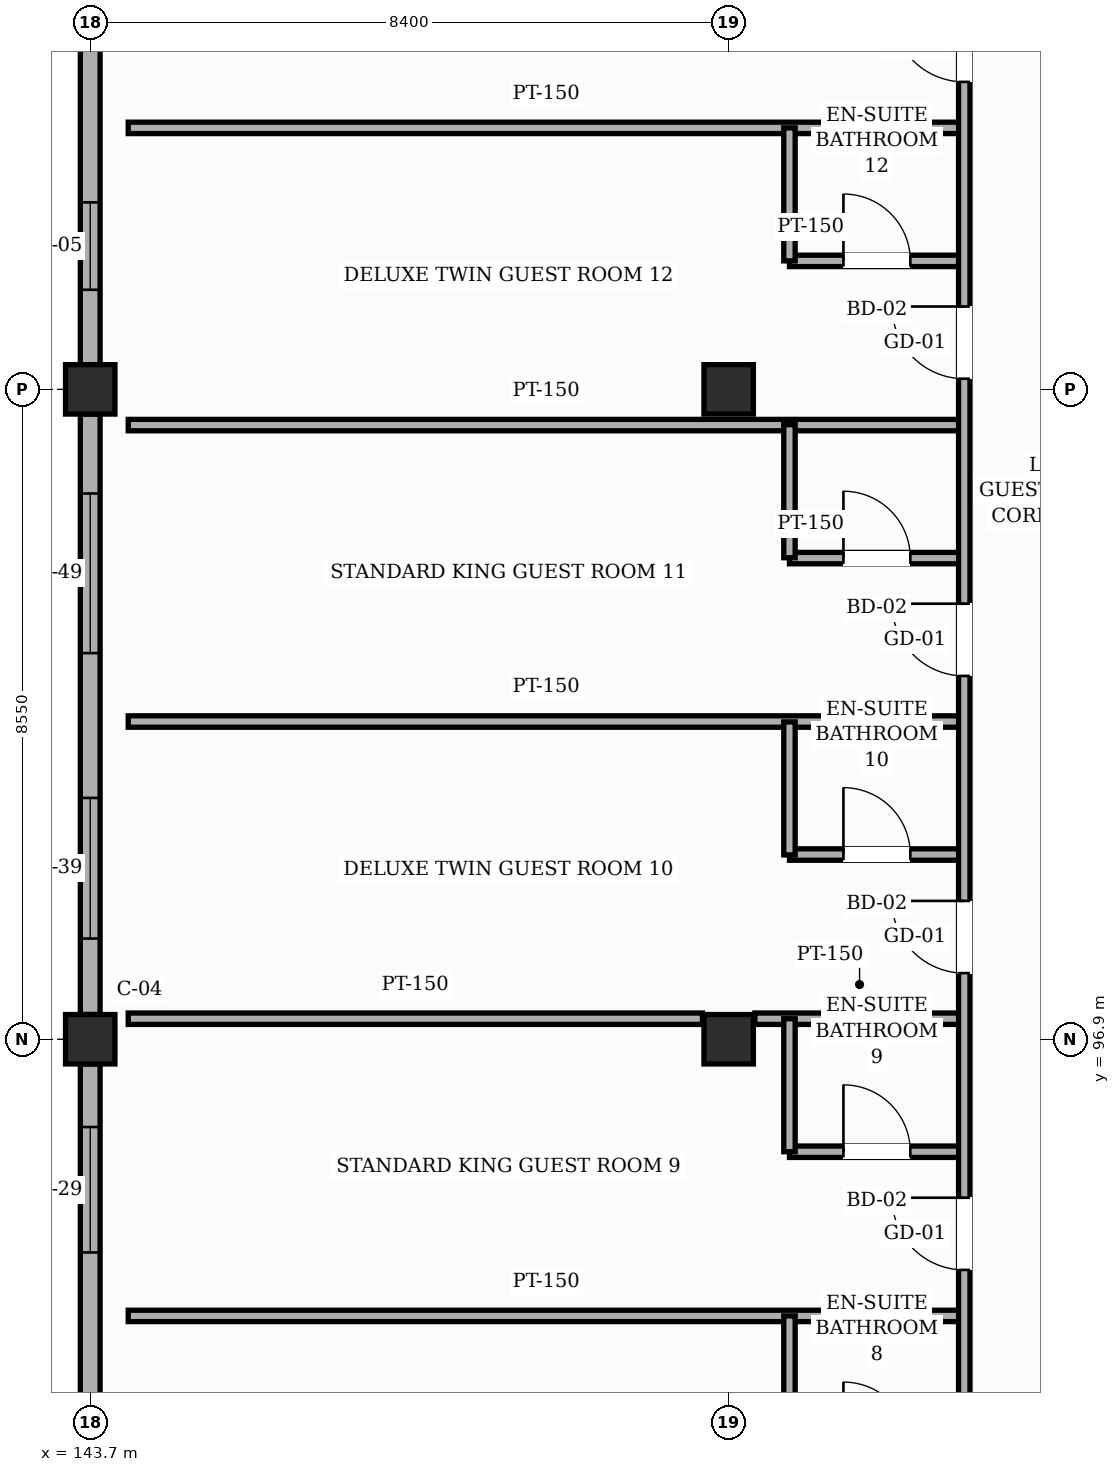
"""IFC4 building model, lengths in metres.
Left out: names, types, materials, properties, quantities, classifications, styles, units other than length and angle.
Written with IfcOpenShell. Run it as: python <this file> out.ifc"""

import sys

from ifc_helpers import new_model, si_unit, direction, frame, frame_2d, origin, origin_2d, place, context, subcontext, project, spatial, rectangle, hollow_rectangle, extrude, element, fill, save


model = new_model("IFC4")
c1 = context("Model", 3, precision=1e-05, world=origin(), true_north=direction((0.0, 1.0)))
c2 = subcontext(c1, "Body", "Model", "MODEL_VIEW")
j1 = project(units=[si_unit("LENGTHUNIT", "METRE"), si_unit("PLANEANGLEUNIT", "RADIAN")], contexts=[c1])
p1 = place(None, origin())
s1 = spatial("IfcSite", under=j1, at=p1, CompositionType="ELEMENT")
p2 = place(p1, origin())
s2 = spatial("IfcBuilding", under=s1, at=p2, CompositionType="ELEMENT")
p3 = place(p2, frame((0.0, 0.0, 15.0)))
s3 = spatial("IfcBuildingStorey", under=s2, at=p3, CompositionType="ELEMENT", Elevation=15.0)
for number, where, z_axis, x_axis in (
    (1, (143.7, 96.9, 0.0), (0.0, 0.0, 1.0), (1.0, 0.0, 0.0)),
    (2, (143.7, 105.45, 0.0), (0.0, 0.0, 1.0), (1.0, 0.0, 0.0)),
    (3, (152.1, 96.9, 0.0), (0.0, 0.0, 1.0), (1.0, 0.0, 0.0)),
    (4, (152.1, 105.45, 0.0), (0.0, 0.0, 1.0), (1.0, 0.0, 0.0)),
):
    element("IfcColumn", number, at=place(p3, frame(where, z_axis=z_axis, x_axis=x_axis)), inside=s3, PredefinedType="COLUMN", context=c2, shape_type="SweptSolid", body=[
        extrude(hollow_rectangle(XDim=0.65, YDim=0.65, WallThickness=0.025, InnerFilletRadius=0.025, OuterFilletRadius=0.05, at=origin_2d()), origin(), (0.0, 0.0, 1.0), 4.8),
    ])
p4 = place(p3, frame((143.7, 89.225, 0.0), z_axis=(0.0, 0.0, 1.0), x_axis=(0.0, 1.0, 0.0)))
e5 = element("IfcWall", 5, at=p4, inside=s3, PredefinedType="SOLIDWALL", context=c2, shape_type="SweptSolid", body=[
    extrude(rectangle(XDim=7.35, YDim=0.26, at=frame_2d((3.675, 0.0))), origin(), (0.0, 0.0, 1.0), 3.985),
])
p5 = place(p4, frame((1.36, 0.0, 0.85)))
e6 = element("IfcOpeningElement", 6, at=p5, cuts=e5, PredefinedType="OPENING", context=c2, shape_type="SweptSolid", body=[
    extrude(rectangle(XDim=1.45, YDim=1.8, at=frame_2d((0.725, 0.9))), frame((0.0, 0.14, 0.0), z_axis=(0.0, -1.0, 0.0), x_axis=(1.0, 0.0, 0.0)), (0.0, 0.0, 1.0), 0.28),
])
p6 = place(p4, frame((4.87, 0.0, 0.85)))
e7 = element("IfcOpeningElement", 7, at=p6, cuts=e5, PredefinedType="OPENING", context=c2, shape_type="SweptSolid", body=[
    extrude(rectangle(XDim=1.65, YDim=1.8, at=frame_2d((0.825, 0.9))), frame((0.0, 0.14, 0.0), z_axis=(0.0, -1.0, 0.0), x_axis=(1.0, 0.0, 0.0)), (0.0, 0.0, 1.0), 0.28),
])
p7 = place(p3, frame((143.7, 97.225, 0.0), z_axis=(0.0, 0.0, 1.0), x_axis=(0.0, 1.0, 0.0)))
e8 = element("IfcWall", 8, at=p7, inside=s3, PredefinedType="SOLIDWALL", context=c2, shape_type="SweptSolid", body=[
    extrude(rectangle(XDim=7.9, YDim=0.26, at=frame_2d((3.95, 0.0))), origin(), (0.0, 0.0, 1.0), 3.835),
])
p8 = place(p7, frame((1.0, 0.0, 0.85)))
e9 = element("IfcOpeningElement", 9, at=p8, cuts=e8, PredefinedType="OPENING", context=c2, shape_type="SweptSolid", body=[
    extrude(rectangle(XDim=1.85, YDim=1.8, at=frame_2d((0.925, 0.9))), frame((0.0, 0.14, 0.0), z_axis=(0.0, -1.0, 0.0), x_axis=(1.0, 0.0, 0.0)), (0.0, 0.0, 1.0), 0.28),
])
p9 = place(p7, frame((4.755, 0.0, 0.85)))
e10 = element("IfcOpeningElement", 10, at=p9, cuts=e8, PredefinedType="OPENING", context=c2, shape_type="SweptSolid", body=[
    extrude(rectangle(XDim=2.1, YDim=1.8, at=frame_2d((1.05, 0.9))), frame((0.0, 0.14, 0.0), z_axis=(0.0, -1.0, 0.0), x_axis=(1.0, 0.0, 0.0)), (0.0, 0.0, 1.0), 0.28),
])
p10 = place(p3, frame((143.7, 105.775, 0.0), z_axis=(0.0, 0.0, 1.0), x_axis=(0.0, 1.0, 0.0)))
e11 = element("IfcWall", 11, at=p10, inside=s3, PredefinedType="SOLIDWALL", context=c2, shape_type="SweptSolid", body=[
    extrude(rectangle(XDim=7.025, YDim=0.26, at=frame_2d((3.513, 0.0))), origin(), (0.0, 0.0, 1.0), 3.985),
])
p11 = place(p10, frame((0.985, 0.0, 0.85)))
e12 = element("IfcOpeningElement", 12, at=p11, cuts=e11, PredefinedType="OPENING", context=c2, shape_type="SweptSolid", body=[
    extrude(rectangle(XDim=1.15, YDim=1.95, at=frame_2d((0.575, 0.975))), frame((0.0, 0.14, 0.0), z_axis=(0.0, -1.0, 0.0), x_axis=(1.0, 0.0, 0.0)), (0.0, 0.0, 1.0), 0.28),
])
p12 = place(p10, frame((4.395, 0.0, 0.85)))
e13 = element("IfcOpeningElement", 13, at=p12, cuts=e11, PredefinedType="OPENING", context=c2, shape_type="SweptSolid", body=[
    extrude(rectangle(XDim=1.35, YDim=1.95, at=frame_2d((0.675, 0.975))), frame((0.0, 0.14, 0.0), z_axis=(0.0, -1.0, 0.0), x_axis=(1.0, 0.0, 0.0)), (0.0, 0.0, 1.0), 0.28),
])
p13 = place(p3, frame((144.2, 93.26, 0.0), z_axis=(0.0, 0.0, 1.0), x_axis=(1.0, 0.0, 0.0)))
e14 = element("IfcWall", 14, at=p13, inside=s3, PredefinedType="PARTITIONING", context=c2, shape_type="SweptSolid", body=[
    extrude(rectangle(XDim=11.0, YDim=0.15, at=frame_2d((5.5, 0.0))), origin(), (0.0, 0.0, 1.0), 4.545),
])
p14 = place(p3, frame((152.9, 95.42, 0.0), z_axis=(0.0, 0.0, 1.0), x_axis=(1.0, 0.0, 0.0)))
e15 = element("IfcWall", 15, at=p14, inside=s3, PredefinedType="PARTITIONING", context=c2, shape_type="SweptSolid", body=[
    extrude(rectangle(XDim=2.3, YDim=0.15, at=frame_2d((1.15, 0.0))), origin(), (0.0, 0.0, 1.0), 4.545),
])
p15 = place(p14, frame((0.71, 0.0, 0.0)))
e16 = element("IfcOpeningElement", 16, at=p15, cuts=e15, PredefinedType="OPENING", context=c2, shape_type="SweptSolid", body=[
    extrude(rectangle(XDim=0.88, YDim=2.12, at=frame_2d((0.44, 1.06))), frame((0.0, 0.085, 0.0), z_axis=(0.0, -1.0, 0.0), x_axis=(1.0, 0.0, 0.0)), (0.0, 0.0, 1.0), 0.17),
])
p16 = place(p3, frame((144.2, 97.17, 0.0), z_axis=(0.0, 0.0, 1.0), x_axis=(1.0, 0.0, 0.0)))
e17 = element("IfcWall", 17, at=p16, inside=s3, PredefinedType="PARTITIONING", context=c2, shape_type="SweptSolid", body=[
    extrude(rectangle(XDim=7.555, YDim=0.15, at=frame_2d((3.777, 0.0))), origin(), (0.0, 0.0, 1.0), 3.885),
])
p17 = place(p3, frame((152.445, 97.17, 0.0), z_axis=(0.0, 0.0, 1.0), x_axis=(1.0, 0.0, 0.0)))
e18 = element("IfcWall", 18, at=p17, inside=s3, PredefinedType="PARTITIONING", context=c2, shape_type="SweptSolid", body=[
    extrude(rectangle(XDim=2.755, YDim=0.15, at=frame_2d((1.377, 0.0))), origin(), (0.0, 0.0, 1.0), 3.885),
])
p18 = place(p3, frame((152.9, 99.33, 0.0), z_axis=(0.0, 0.0, 1.0), x_axis=(1.0, 0.0, 0.0)))
e19 = element("IfcWall", 19, at=p18, inside=s3, PredefinedType="PARTITIONING", context=c2, shape_type="SweptSolid", body=[
    extrude(rectangle(XDim=2.3, YDim=0.15, at=frame_2d((1.15, 0.0))), origin(), (0.0, 0.0, 1.0), 4.545),
])
p19 = place(p18, frame((0.71, 0.0, 0.0)))
e20 = element("IfcOpeningElement", 20, at=p19, cuts=e19, PredefinedType="OPENING", context=c2, shape_type="SweptSolid", body=[
    extrude(rectangle(XDim=0.88, YDim=2.12, at=frame_2d((0.44, 1.06))), frame((0.0, 0.085, 0.0), z_axis=(0.0, -1.0, 0.0), x_axis=(1.0, 0.0, 0.0)), (0.0, 0.0, 1.0), 0.17),
])
p20 = place(p3, frame((144.2, 101.08, 0.0), z_axis=(0.0, 0.0, 1.0), x_axis=(1.0, 0.0, 0.0)))
e21 = element("IfcWall", 21, at=p20, inside=s3, PredefinedType="PARTITIONING", context=c2, shape_type="SweptSolid", body=[
    extrude(rectangle(XDim=11.0, YDim=0.15, at=frame_2d((5.5, 0.0))), origin(), (0.0, 0.0, 1.0), 4.185),
])
p21 = place(p3, frame((152.9, 103.23, 0.0), z_axis=(0.0, 0.0, 1.0), x_axis=(1.0, 0.0, 0.0)))
e22 = element("IfcWall", 22, at=p21, inside=s3, PredefinedType="PARTITIONING", context=c2, shape_type="SweptSolid", body=[
    extrude(rectangle(XDim=2.3, YDim=0.15, at=frame_2d((1.15, 0.0))), origin(), (0.0, 0.0, 1.0), 4.545),
])
p22 = place(p21, frame((0.71, 0.0, 0.0)))
e23 = element("IfcOpeningElement", 23, at=p22, cuts=e22, PredefinedType="OPENING", context=c2, shape_type="SweptSolid", body=[
    extrude(rectangle(XDim=0.88, YDim=2.12, at=frame_2d((0.44, 1.06))), frame((0.0, 0.085, 0.0), z_axis=(0.0, -1.0, 0.0), x_axis=(1.0, 0.0, 0.0)), (0.0, 0.0, 1.0), 0.17),
])
p23 = place(p3, frame((144.2, 104.98, 0.0), z_axis=(0.0, 0.0, 1.0), x_axis=(1.0, 0.0, 0.0)))
e24 = element("IfcWall", 24, at=p23, inside=s3, PredefinedType="PARTITIONING", context=c2, shape_type="SweptSolid", body=[
    extrude(rectangle(XDim=11.0, YDim=0.15, at=frame_2d((5.5, 0.0))), origin(), (0.0, 0.0, 1.0), 4.545),
])
p24 = place(p3, frame((152.9, 107.14, 0.0), z_axis=(0.0, 0.0, 1.0), x_axis=(1.0, 0.0, 0.0)))
e25 = element("IfcWall", 25, at=p24, inside=s3, PredefinedType="PARTITIONING", context=c2, shape_type="SweptSolid", body=[
    extrude(rectangle(XDim=2.3, YDim=0.15, at=frame_2d((1.15, 0.0))), origin(), (0.0, 0.0, 1.0), 4.545),
])
p25 = place(p24, frame((0.71, 0.0, 0.0)))
e26 = element("IfcOpeningElement", 26, at=p25, cuts=e25, PredefinedType="OPENING", context=c2, shape_type="SweptSolid", body=[
    extrude(rectangle(XDim=0.88, YDim=2.12, at=frame_2d((0.44, 1.06))), frame((0.0, 0.085, 0.0), z_axis=(0.0, -1.0, 0.0), x_axis=(1.0, 0.0, 0.0)), (0.0, 0.0, 1.0), 0.17),
])
p26 = place(p3, frame((144.2, 108.89, 0.0), z_axis=(0.0, 0.0, 1.0), x_axis=(1.0, 0.0, 0.0)))
e27 = element("IfcWall", 27, at=p26, inside=s3, PredefinedType="PARTITIONING", context=c2, shape_type="SweptSolid", body=[
    extrude(rectangle(XDim=11.0, YDim=0.15, at=frame_2d((5.5, 0.0))), origin(), (0.0, 0.0, 1.0), 4.545),
])
for number, where, z_axis, x_axis in (
    (28, (152.9, 91.51, 0.0), (0.0, 0.0, 1.0), (0.0, 1.0, 0.0)),
    (29, (152.9, 95.42, 0.0), (0.0, 0.0, 1.0), (0.0, 1.0, 0.0)),
    (30, (152.9, 99.325, 0.0), (0.0, 0.0, 1.0), (0.0, 1.0, 0.0)),
    (31, (152.9, 103.235, 0.0), (0.0, 0.0, 1.0), (0.0, 1.0, 0.0)),
    (32, (152.9, 107.14, 0.0), (0.0, 0.0, 1.0), (0.0, 1.0, 0.0)),
):
    element("IfcWall", number, at=place(p3, frame(where, z_axis=z_axis, x_axis=x_axis)), inside=s3, PredefinedType="PARTITIONING", context=c2, shape_type="SweptSolid", body=[
        extrude(rectangle(XDim=1.75, YDim=0.15, at=frame_2d((0.875, 0.0))), origin(), (0.0, 0.0, 1.0), 4.545),
    ])
p27 = place(p3, frame((155.2, 62.0, 0.0), z_axis=(0.0, 0.0, 1.0), x_axis=(0.0, 1.0, 0.0)))
e33 = element("IfcWall", 33, at=p27, inside=s3, PredefinedType="PARTITIONING", context=c2, shape_type="SweptSolid", body=[
    extrude(rectangle(XDim=50.8, YDim=0.15, at=frame_2d((25.4, 0.0))), origin(), (0.0, 0.0, 1.0), 4.545),
])
p28 = place(p27, frame((0.53, 0.0, 0.0)))
e34 = element("IfcOpeningElement", 34, at=p28, cuts=e33, PredefinedType="OPENING", context=c2, shape_type="SweptSolid", body=[
    extrude(rectangle(XDim=1.1, YDim=2.2, at=frame_2d((0.55, 1.1))), frame((0.0, 0.085, 0.0), z_axis=(0.0, -1.0, 0.0), x_axis=(1.0, 0.0, 0.0)), (0.0, 0.0, 1.0), 0.17),
])
p29 = place(p27, frame((4.51, 0.0, 0.0)))
e35 = element("IfcOpeningElement", 35, at=p29, cuts=e33, PredefinedType="OPENING", context=c2, shape_type="SweptSolid", body=[
    extrude(rectangle(XDim=0.95, YDim=2.15, at=frame_2d((0.475, 1.075))), frame((0.0, 0.085, 0.0), z_axis=(0.0, -1.0, 0.0), x_axis=(1.0, 0.0, 0.0)), (0.0, 0.0, 1.0), 0.17),
])
p30 = place(p27, frame((8.42, 0.0, 0.0)))
e36 = element("IfcOpeningElement", 36, at=p30, cuts=e33, PredefinedType="OPENING", context=c2, shape_type="SweptSolid", body=[
    extrude(rectangle(XDim=0.95, YDim=2.15, at=frame_2d((0.475, 1.075))), frame((0.0, 0.085, 0.0), z_axis=(0.0, -1.0, 0.0), x_axis=(1.0, 0.0, 0.0)), (0.0, 0.0, 1.0), 0.17),
])
p31 = place(p27, frame((12.33, 0.0, 0.0)))
e37 = element("IfcOpeningElement", 37, at=p31, cuts=e33, PredefinedType="OPENING", context=c2, shape_type="SweptSolid", body=[
    extrude(rectangle(XDim=0.95, YDim=2.15, at=frame_2d((0.475, 1.075))), frame((0.0, 0.085, 0.0), z_axis=(0.0, -1.0, 0.0), x_axis=(1.0, 0.0, 0.0)), (0.0, 0.0, 1.0), 0.17),
])
p32 = place(p27, frame((16.235, 0.0, 0.0)))
e38 = element("IfcOpeningElement", 38, at=p32, cuts=e33, PredefinedType="OPENING", context=c2, shape_type="SweptSolid", body=[
    extrude(rectangle(XDim=0.95, YDim=2.15, at=frame_2d((0.475, 1.075))), frame((0.0, 0.085, 0.0), z_axis=(0.0, -1.0, 0.0), x_axis=(1.0, 0.0, 0.0)), (0.0, 0.0, 1.0), 0.17),
])
p33 = place(p27, frame((20.145, 0.0, 0.0)))
e39 = element("IfcOpeningElement", 39, at=p33, cuts=e33, PredefinedType="OPENING", context=c2, shape_type="SweptSolid", body=[
    extrude(rectangle(XDim=0.95, YDim=2.15, at=frame_2d((0.475, 1.075))), frame((0.0, 0.085, 0.0), z_axis=(0.0, -1.0, 0.0), x_axis=(1.0, 0.0, 0.0)), (0.0, 0.0, 1.0), 0.17),
])
p34 = place(p27, frame((24.05, 0.0, 0.0)))
e40 = element("IfcOpeningElement", 40, at=p34, cuts=e33, PredefinedType="OPENING", context=c2, shape_type="SweptSolid", body=[
    extrude(rectangle(XDim=0.95, YDim=2.15, at=frame_2d((0.475, 1.075))), frame((0.0, 0.085, 0.0), z_axis=(0.0, -1.0, 0.0), x_axis=(1.0, 0.0, 0.0)), (0.0, 0.0, 1.0), 0.17),
])
p35 = place(p27, frame((27.96, 0.0, 0.0)))
e41 = element("IfcOpeningElement", 41, at=p35, cuts=e33, PredefinedType="OPENING", context=c2, shape_type="SweptSolid", body=[
    extrude(rectangle(XDim=0.95, YDim=2.15, at=frame_2d((0.475, 1.075))), frame((0.0, 0.085, 0.0), z_axis=(0.0, -1.0, 0.0), x_axis=(1.0, 0.0, 0.0)), (0.0, 0.0, 1.0), 0.17),
])
p36 = place(p27, frame((31.865, 0.0, 0.0)))
e42 = element("IfcOpeningElement", 42, at=p36, cuts=e33, PredefinedType="OPENING", context=c2, shape_type="SweptSolid", body=[
    extrude(rectangle(XDim=0.95, YDim=2.15, at=frame_2d((0.475, 1.075))), frame((0.0, 0.085, 0.0), z_axis=(0.0, -1.0, 0.0), x_axis=(1.0, 0.0, 0.0)), (0.0, 0.0, 1.0), 0.17),
])
p37 = place(p27, frame((35.77, 0.0, 0.0)))
e43 = element("IfcOpeningElement", 43, at=p37, cuts=e33, PredefinedType="OPENING", context=c2, shape_type="SweptSolid", body=[
    extrude(rectangle(XDim=0.95, YDim=2.15, at=frame_2d((0.475, 1.075))), frame((0.0, 0.085, 0.0), z_axis=(0.0, -1.0, 0.0), x_axis=(1.0, 0.0, 0.0)), (0.0, 0.0, 1.0), 0.17),
])
p38 = place(p27, frame((39.68, 0.0, 0.0)))
e44 = element("IfcOpeningElement", 44, at=p38, cuts=e33, PredefinedType="OPENING", context=c2, shape_type="SweptSolid", body=[
    extrude(rectangle(XDim=0.95, YDim=2.15, at=frame_2d((0.475, 1.075))), frame((0.0, 0.085, 0.0), z_axis=(0.0, -1.0, 0.0), x_axis=(1.0, 0.0, 0.0)), (0.0, 0.0, 1.0), 0.17),
])
p39 = place(p27, frame((43.59, 0.0, 0.0)))
e45 = element("IfcOpeningElement", 45, at=p39, cuts=e33, PredefinedType="OPENING", context=c2, shape_type="SweptSolid", body=[
    extrude(rectangle(XDim=0.95, YDim=2.15, at=frame_2d((0.475, 1.075))), frame((0.0, 0.085, 0.0), z_axis=(0.0, -1.0, 0.0), x_axis=(1.0, 0.0, 0.0)), (0.0, 0.0, 1.0), 0.17),
])
p40 = place(p27, frame((47.495, 0.0, 0.0)))
e46 = element("IfcOpeningElement", 46, at=p40, cuts=e33, PredefinedType="OPENING", context=c2, shape_type="SweptSolid", body=[
    extrude(rectangle(XDim=0.95, YDim=2.15, at=frame_2d((0.475, 1.075))), frame((0.0, 0.085, 0.0), z_axis=(0.0, -1.0, 0.0), x_axis=(1.0, 0.0, 0.0)), (0.0, 0.0, 1.0), 0.17),
])
p41 = place(p6, origin())
e47 = element("IfcWindow", 47, at=p41, inside=s3, PartitioningType="SINGLE_PANEL", PredefinedType="WINDOW", context=c2, shape_type="SweptSolid", body=[
    extrude(rectangle(XDim=1.65, YDim=1.8, at=frame_2d((0.825, 0.9))), frame((0.0, 0.03, 0.0), z_axis=(0.0, -1.0, 0.0), x_axis=(1.0, 0.0, 0.0)), (0.0, 0.0, 1.0), 0.06),
])
fill(e7, e47)
p42 = place(p8, origin())
e48 = element("IfcWindow", 48, at=p42, inside=s3, PartitioningType="SINGLE_PANEL", PredefinedType="WINDOW", context=c2, shape_type="SweptSolid", body=[
    extrude(rectangle(XDim=1.85, YDim=1.8, at=frame_2d((0.925, 0.9))), frame((0.0, 0.03, 0.0), z_axis=(0.0, -1.0, 0.0), x_axis=(1.0, 0.0, 0.0)), (0.0, 0.0, 1.0), 0.06),
])
fill(e9, e48)
p43 = place(p9, origin())
e49 = element("IfcWindow", 49, at=p43, inside=s3, PartitioningType="SINGLE_PANEL", PredefinedType="WINDOW", context=c2, shape_type="SweptSolid", body=[
    extrude(rectangle(XDim=2.1, YDim=1.8, at=frame_2d((1.05, 0.9))), frame((0.0, 0.03, 0.0), z_axis=(0.0, -1.0, 0.0), x_axis=(1.0, 0.0, 0.0)), (0.0, 0.0, 1.0), 0.06),
])
fill(e10, e49)
p44 = place(p11, origin())
e50 = element("IfcWindow", 50, at=p44, inside=s3, PartitioningType="SINGLE_PANEL", PredefinedType="WINDOW", context=c2, shape_type="SweptSolid", body=[
    extrude(rectangle(XDim=1.15, YDim=1.95, at=frame_2d((0.575, 0.975))), frame((0.0, 0.03, 0.0), z_axis=(0.0, -1.0, 0.0), x_axis=(1.0, 0.0, 0.0)), (0.0, 0.0, 1.0), 0.06),
])
fill(e12, e50)
p45 = place(p36, origin())
e51 = element("IfcDoor", 51, at=p45, inside=s3, OperationType="SINGLE_SWING_RIGHT", PredefinedType="DOOR", context=c2, shape_type="SweptSolid", body=[
    extrude(rectangle(XDim=0.95, YDim=2.15, at=frame_2d((0.475, 1.075))), frame((0.0, 0.025, 0.0), z_axis=(0.0, -1.0, 0.0), x_axis=(1.0, 0.0, 0.0)), (0.0, 0.0, 1.0), 0.05),
])
fill(e42, e51)
p46 = place(p15, origin())
e52 = element("IfcDoor", 52, at=p46, inside=s3, OperationType="SINGLE_SWING_LEFT", PredefinedType="DOOR", context=c2, shape_type="SweptSolid", body=[
    extrude(rectangle(XDim=0.88, YDim=2.12, at=frame_2d((0.44, 1.06))), frame((0.0, 0.025, 0.0), z_axis=(0.0, -1.0, 0.0), x_axis=(1.0, 0.0, 0.0)), (0.0, 0.0, 1.0), 0.05),
])
fill(e16, e52)
p47 = place(p37, origin())
e53 = element("IfcDoor", 53, at=p47, inside=s3, OperationType="SINGLE_SWING_RIGHT", PredefinedType="DOOR", context=c2, shape_type="SweptSolid", body=[
    extrude(rectangle(XDim=0.95, YDim=2.15, at=frame_2d((0.475, 1.075))), frame((0.0, 0.025, 0.0), z_axis=(0.0, -1.0, 0.0), x_axis=(1.0, 0.0, 0.0)), (0.0, 0.0, 1.0), 0.05),
])
fill(e43, e53)
p48 = place(p19, origin())
e54 = element("IfcDoor", 54, at=p48, inside=s3, OperationType="SINGLE_SWING_LEFT", PredefinedType="DOOR", context=c2, shape_type="SweptSolid", body=[
    extrude(rectangle(XDim=0.88, YDim=2.12, at=frame_2d((0.44, 1.06))), frame((0.0, 0.025, 0.0), z_axis=(0.0, -1.0, 0.0), x_axis=(1.0, 0.0, 0.0)), (0.0, 0.0, 1.0), 0.05),
])
fill(e20, e54)
p49 = place(p38, origin())
e55 = element("IfcDoor", 55, at=p49, inside=s3, OperationType="SINGLE_SWING_RIGHT", PredefinedType="DOOR", context=c2, shape_type="SweptSolid", body=[
    extrude(rectangle(XDim=0.95, YDim=2.15, at=frame_2d((0.475, 1.075))), frame((0.0, 0.025, 0.0), z_axis=(0.0, -1.0, 0.0), x_axis=(1.0, 0.0, 0.0)), (0.0, 0.0, 1.0), 0.05),
])
fill(e44, e55)
p50 = place(p22, origin())
e56 = element("IfcDoor", 56, at=p50, inside=s3, OperationType="SINGLE_SWING_LEFT", PredefinedType="DOOR", context=c2, shape_type="SweptSolid", body=[
    extrude(rectangle(XDim=0.88, YDim=2.12, at=frame_2d((0.44, 1.06))), frame((0.0, 0.025, 0.0), z_axis=(0.0, -1.0, 0.0), x_axis=(1.0, 0.0, 0.0)), (0.0, 0.0, 1.0), 0.05),
])
fill(e23, e56)
p51 = place(p39, origin())
e57 = element("IfcDoor", 57, at=p51, inside=s3, OperationType="SINGLE_SWING_RIGHT", PredefinedType="DOOR", context=c2, shape_type="SweptSolid", body=[
    extrude(rectangle(XDim=0.95, YDim=2.15, at=frame_2d((0.475, 1.075))), frame((0.0, 0.025, 0.0), z_axis=(0.0, -1.0, 0.0), x_axis=(1.0, 0.0, 0.0)), (0.0, 0.0, 1.0), 0.05),
])
fill(e45, e57)
p52 = place(p25, origin())
e58 = element("IfcDoor", 58, at=p52, inside=s3, OperationType="SINGLE_SWING_LEFT", PredefinedType="DOOR", context=c2, shape_type="SweptSolid", body=[
    extrude(rectangle(XDim=0.88, YDim=2.12, at=frame_2d((0.44, 1.06))), frame((0.0, 0.025, 0.0), z_axis=(0.0, -1.0, 0.0), x_axis=(1.0, 0.0, 0.0)), (0.0, 0.0, 1.0), 0.05),
])
fill(e26, e58)
p53 = place(p40, origin())
e59 = element("IfcDoor", 59, at=p53, inside=s3, OperationType="SINGLE_SWING_RIGHT", PredefinedType="DOOR", context=c2, shape_type="SweptSolid", body=[
    extrude(rectangle(XDim=0.95, YDim=2.15, at=frame_2d((0.475, 1.075))), frame((0.0, 0.025, 0.0), z_axis=(0.0, -1.0, 0.0), x_axis=(1.0, 0.0, 0.0)), (0.0, 0.0, 1.0), 0.05),
])
fill(e46, e59)
save(model, sys.argv[1])
